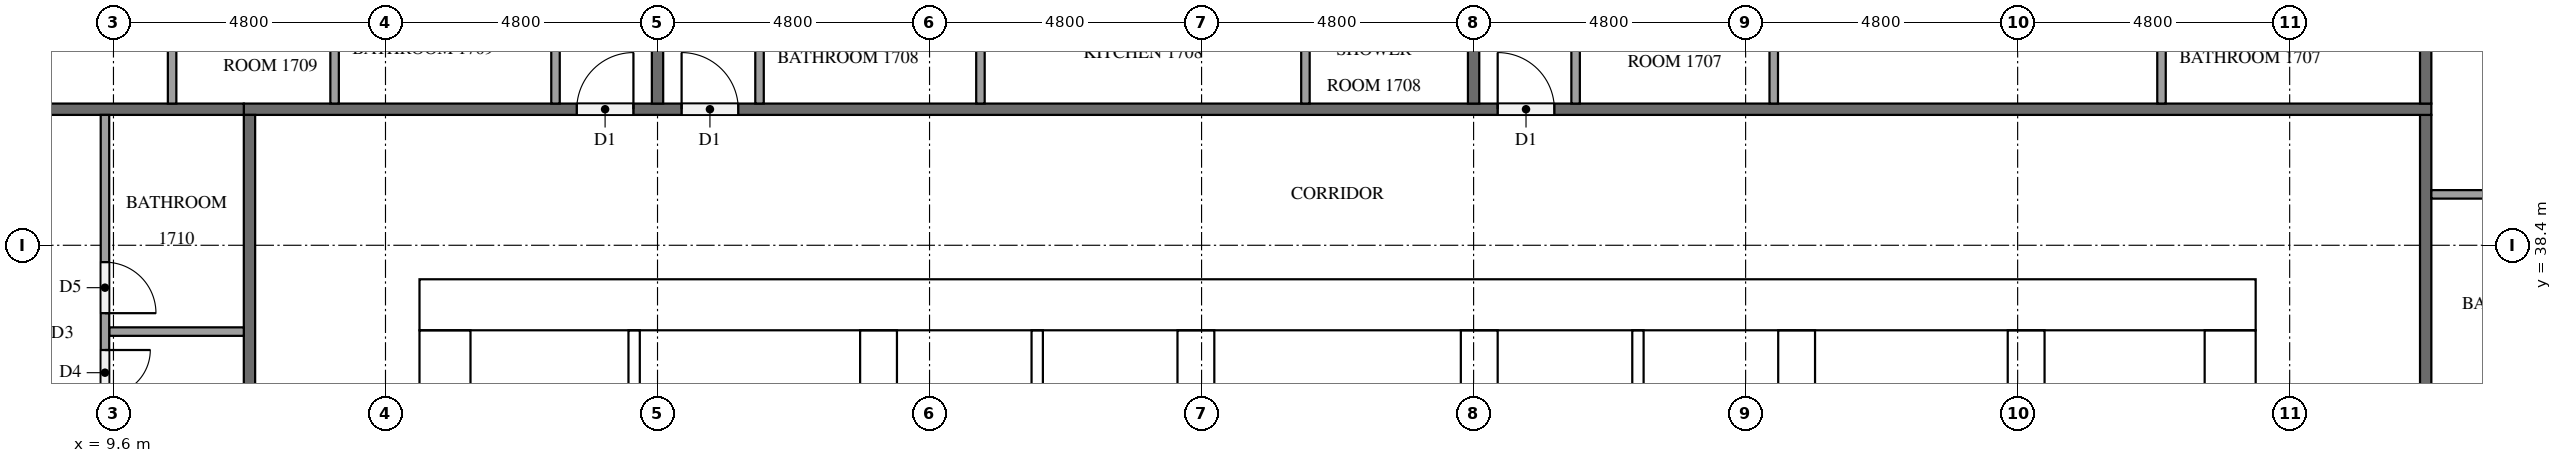
"""IFC4 building model, lengths in metres.
Left out: names, types, materials, properties, quantities, classifications, styles, units other than length and angle.
Written with IfcOpenShell. Run it as: python <this file> out.ifc"""

import sys

from ifc_helpers import new_model, si_unit, direction, frame, frame_2d, origin, place, context, subcontext, project, spatial, rectangle, extrude, element, fill, save


model = new_model("IFC4")
c1 = context("Model", 3, precision=1e-05, world=origin(), true_north=direction((0.0, 1.0)))
c2 = subcontext(c1, "Body", "Model", "MODEL_VIEW")
j1 = project(units=[si_unit("LENGTHUNIT", "METRE"), si_unit("PLANEANGLEUNIT", "RADIAN")], contexts=[c1])
p1 = place(None, origin())
s1 = spatial("IfcSite", under=j1, at=p1, CompositionType="ELEMENT")
p2 = place(p1, origin())
s2 = spatial("IfcBuilding", under=s1, at=p2, CompositionType="ELEMENT")
p3 = place(p2, frame((0.0, 0.0, 69.8)))
s3 = spatial("IfcBuildingStorey", under=s2, at=p3, CompositionType="ELEMENT", Elevation=69.8)
p4 = place(p3, frame((15.0, 37.35, 0.0), z_axis=(0.0, 0.0, 1.0), x_axis=(1.0, 0.0, 0.0)))
e1 = element("IfcWall", 1, at=p4, inside=s3, PredefinedType="SHEAR", context=c2, shape_type="SweptSolid", body=[
    extrude(rectangle(XDim=32.4, YDim=0.9, at=frame_2d((16.2, 0.0))), origin(), (0.0, 0.0, 1.0), 3.2),
])
p5 = place(p4, frame((15.3, 0.0, 0.0)))
e2 = element("IfcOpeningElement", 2, at=p5, cuts=e1, PredefinedType="OPENING", context=c2, shape_type="SweptSolid", body=[
    extrude(rectangle(XDim=1.8, YDim=2.1, at=frame_2d((0.9, 1.05))), frame((0.0, 0.46, 0.0), z_axis=(0.0, -1.0, 0.0), x_axis=(1.0, 0.0, 0.0)), (0.0, 0.0, 1.0), 0.92),
])
p6 = place(p4, frame((1.794, 0.0, 0.0)))
e3 = element("IfcOpeningElement", 3, at=p6, cuts=e1, PredefinedType="OPENING", context=c2, shape_type="SweptSolid", body=[
    extrude(rectangle(XDim=1.0, YDim=2.1, at=frame_2d((0.5, 1.05))), frame((0.0, 0.46, 0.0), z_axis=(0.0, -1.0, 0.0), x_axis=(1.0, 0.0, 0.0)), (0.0, 0.0, 1.0), 0.92),
])
p7 = place(p4, frame((5.331, 0.0, 0.0)))
e4 = element("IfcOpeningElement", 4, at=p7, cuts=e1, PredefinedType="OPENING", context=c2, shape_type="SweptSolid", body=[
    extrude(rectangle(XDim=1.0, YDim=2.1, at=frame_2d((0.5, 1.05))), frame((0.0, 0.46, 0.0), z_axis=(0.0, -1.0, 0.0), x_axis=(1.0, 0.0, 0.0)), (0.0, 0.0, 1.0), 0.92),
])
p8 = place(p3, frame((15.45, 15.9, 0.0), z_axis=(0.0, 0.0, 1.0), x_axis=(0.0, 1.0, 0.0)))
e5 = element("IfcWall", 5, at=p8, inside=s3, PredefinedType="SHEAR", context=c2, shape_type="SweptSolid", body=[
    extrude(rectangle(XDim=21.0, YDim=0.9, at=frame_2d((10.5, 0.0))), origin(), (0.0, 0.0, 1.0), 3.2),
])
p9 = place(p8, frame((4.86, 0.0, 0.0)))
e6 = element("IfcOpeningElement", 6, at=p9, cuts=e5, PredefinedType="OPENING", context=c2, shape_type="SweptSolid", body=[
    extrude(rectangle(XDim=1.2, YDim=2.1, at=frame_2d((0.6, 1.05))), frame((0.0, 0.46, 0.0), z_axis=(0.0, -1.0, 0.0), x_axis=(1.0, 0.0, 0.0)), (0.0, 0.0, 1.0), 0.92),
])
p10 = place(p3, frame((46.95, 15.9, 0.0), z_axis=(0.0, 0.0, 1.0), x_axis=(0.0, 1.0, 0.0)))
e7 = element("IfcWall", 7, at=p10, inside=s3, PredefinedType="SHEAR", context=c2, shape_type="SweptSolid", body=[
    extrude(rectangle(XDim=21.0, YDim=0.9, at=frame_2d((10.5, 0.0))), origin(), (0.0, 0.0, 1.0), 3.2),
])
p11 = place(p10, frame((10.2, 0.0, 0.0)))
e8 = element("IfcOpeningElement", 8, at=p11, cuts=e7, PredefinedType="OPENING", context=c2, shape_type="SweptSolid", body=[
    extrude(rectangle(XDim=1.2, YDim=2.1, at=frame_2d((0.6, 1.05))), frame((0.0, 0.46, 0.0), z_axis=(0.0, -1.0, 0.0), x_axis=(1.0, 0.0, 0.0)), (0.0, 0.0, 1.0), 0.92),
])
p12 = place(p3, frame((23.1, 15.9, 0.0), z_axis=(0.0, 0.0, 1.0), x_axis=(0.0, 1.0, 0.0)))
e9 = element("IfcWall", 9, at=p12, inside=s3, PredefinedType="SHEAR", context=c2, shape_type="SweptSolid", body=[
    extrude(rectangle(XDim=21.0, YDim=0.65, at=frame_2d((10.5, 0.0))), origin(), (0.0, 0.0, 1.0), 3.2),
])
p13 = place(p3, frame((39.3, 27.75, 0.0), z_axis=(0.0, 0.0, 1.0), x_axis=(0.0, 1.0, 0.0)))
e10 = element("IfcWall", 10, at=p13, inside=s3, PredefinedType="SHEAR", context=c2, shape_type="SweptSolid", body=[
    extrude(rectangle(XDim=9.15, YDim=0.65, at=frame_2d((4.575, 0.0))), origin(), (0.0, 0.0, 1.0), 3.2),
])
p14 = place(p3, frame((43.35, 27.75, 0.0), z_axis=(0.0, 0.0, 1.0), x_axis=(0.0, 1.0, 0.0)))
e11 = element("IfcWall", 11, at=p14, inside=s3, PredefinedType="SHEAR", context=c2, shape_type="SweptSolid", body=[
    extrude(rectangle(XDim=9.15, YDim=0.65, at=frame_2d((4.575, 0.0))), origin(), (0.0, 0.0, 1.0), 3.2),
])
p15 = place(p14, frame((7.65, 0.0, 0.0)))
e12 = element("IfcOpeningElement", 12, at=p15, cuts=e11, PredefinedType="OPENING", context=c2, shape_type="SweptSolid", body=[
    extrude(rectangle(XDim=1.2, YDim=2.1, at=frame_2d((0.6, 1.05))), frame((0.0, 0.335, 0.0), z_axis=(0.0, -1.0, 0.0), x_axis=(1.0, 0.0, 0.0)), (0.0, 0.0, 1.0), 0.67),
])
for number, where, z_axis, x_axis in (
    (13, (28.7, 33.875, 0.0), (0.0, 0.0, 1.0), (0.0, 1.0, 0.0)),
    (14, (33.7, 33.875, 0.0), (0.0, 0.0, 1.0), (0.0, 1.0, 0.0)),
):
    element("IfcWall", number, at=place(p3, frame(where, z_axis=z_axis, x_axis=x_axis)), inside=s3, PredefinedType="SHEAR", context=c2, shape_type="SweptSolid", body=[
        extrude(rectangle(XDim=3.025, YDim=0.65, at=frame_2d((1.512, 0.0))), origin(), (0.0, 0.0, 1.0), 3.2),
    ])
for number, where, z_axis, x_axis in (
    (15, (25.9, 33.875, 0.0), (0.0, 0.0, 1.0), (0.0, 1.0, 0.0)),
    (16, (36.5, 33.875, 0.0), (0.0, 0.0, 1.0), (0.0, 1.0, 0.0)),
):
    element("IfcWall", number, at=place(p3, frame(where, z_axis=z_axis, x_axis=x_axis)), inside=s3, PredefinedType="SOLIDWALL", context=c2, shape_type="SweptSolid", body=[
        extrude(rectangle(XDim=3.025, YDim=0.2, at=frame_2d((1.512, 0.0))), origin(), (0.0, 0.0, 1.0), 3.2),
    ])
p16 = place(p3, frame((18.788, 31.575, 0.0), z_axis=(0.0, 0.0, 1.0), x_axis=(0.0, 1.0, 0.0)))
e17 = element("IfcWall", 17, at=p16, inside=s3, PredefinedType="PARTITIONING", context=c2, shape_type="SweptSolid", body=[
    extrude(rectangle(XDim=5.325, YDim=0.2, at=frame_2d((2.663, 0.0))), origin(), (0.0, 0.0, 1.0), 3.2),
])
p17 = place(p3, frame((50.4, 40.7, 0.0), z_axis=(0.0, 0.0, 1.0), x_axis=(0.0, -1.0, 0.0)))
e18 = element("IfcWall", 18, at=p17, inside=s3, PredefinedType="PARTITIONING", context=c2, shape_type="SweptSolid", body=[
    extrude(rectangle(XDim=28.6, YDim=0.2, at=frame_2d((14.3, 0.0))), origin(), (0.0, 0.0, 1.0), 3.2),
])
p18 = place(p17, frame((21.875, 0.0, 0.0)))
e19 = element("IfcOpeningElement", 19, at=p18, cuts=e18, PredefinedType="OPENING", context=c2, shape_type="SweptSolid", body=[
    extrude(rectangle(XDim=1.1, YDim=2.1, at=frame_2d((0.55, 1.05))), frame((0.0, 0.11, 0.0), z_axis=(0.0, -1.0, 0.0), x_axis=(1.0, 0.0, 0.0)), (0.0, 0.0, 1.0), 0.22),
])
p19 = place(p17, frame((20.075, 0.0, 0.0)))
e20 = element("IfcOpeningElement", 20, at=p19, cuts=e18, PredefinedType="OPENING", context=c2, shape_type="SweptSolid", body=[
    extrude(rectangle(XDim=1.0, YDim=2.1, at=frame_2d((0.5, 1.05))), frame((0.0, 0.11, 0.0), z_axis=(0.0, -1.0, 0.0), x_axis=(1.0, 0.0, 0.0)), (0.0, 0.0, 1.0), 0.22),
])
p20 = place(p17, frame((5.675, 0.0, 0.0)))
e21 = element("IfcOpeningElement", 21, at=p20, cuts=e18, PredefinedType="OPENING", context=c2, shape_type="SweptSolid", body=[
    extrude(rectangle(XDim=1.0, YDim=2.1, at=frame_2d((0.5, 1.05))), frame((0.0, 0.11, 0.0), z_axis=(0.0, -1.0, 0.0), x_axis=(1.0, 0.0, 0.0)), (0.0, 0.0, 1.0), 0.22),
])
p21 = place(p3, frame((11.9, 40.8, 0.0), z_axis=(0.0, 0.0, 1.0), x_axis=(1.0, 0.0, 0.0)))
e22 = element("IfcWall", 22, at=p21, inside=s3, PredefinedType="PARTITIONING", context=c2, shape_type="SweptSolid", body=[
    extrude(rectangle(XDim=38.6, YDim=0.2, at=frame_2d((19.3, 0.0))), origin(), (0.0, 0.0, 1.0), 3.2),
])
p22 = place(p21, frame((22.125, 0.0, 0.0)))
e23 = element("IfcOpeningElement", 23, at=p22, cuts=e22, PredefinedType="OPENING", context=c2, shape_type="SweptSolid", body=[
    extrude(rectangle(XDim=1.0, YDim=2.1, at=frame_2d((0.5, 1.05))), frame((0.0, 0.11, 0.0), z_axis=(0.0, -1.0, 0.0), x_axis=(1.0, 0.0, 0.0)), (0.0, 0.0, 1.0), 0.22),
])
p23 = place(p21, frame((7.725, 0.0, 0.0)))
e24 = element("IfcOpeningElement", 24, at=p23, cuts=e22, PredefinedType="OPENING", context=c2, shape_type="SweptSolid", body=[
    extrude(rectangle(XDim=1.0, YDim=2.1, at=frame_2d((0.5, 1.05))), frame((0.0, 0.11, 0.0), z_axis=(0.0, -1.0, 0.0), x_axis=(1.0, 0.0, 0.0)), (0.0, 0.0, 1.0), 0.22),
])
p24 = place(p21, frame((5.875, 0.0, 0.0)))
e25 = element("IfcOpeningElement", 25, at=p24, cuts=e22, PredefinedType="OPENING", context=c2, shape_type="SweptSolid", body=[
    extrude(rectangle(XDim=1.0, YDim=2.1, at=frame_2d((0.5, 1.05))), frame((0.0, 0.11, 0.0), z_axis=(0.0, -1.0, 0.0), x_axis=(1.0, 0.0, 0.0)), (0.0, 0.0, 1.0), 0.22),
])
p25 = place(p3, frame((12.0, 12.1, 0.0), z_axis=(0.0, 0.0, 1.0), x_axis=(0.0, 1.0, 0.0)))
e26 = element("IfcWall", 26, at=p25, inside=s3, PredefinedType="PARTITIONING", context=c2, shape_type="SweptSolid", body=[
    extrude(rectangle(XDim=28.6, YDim=0.2, at=frame_2d((14.3, 0.0))), origin(), (0.0, 0.0, 1.0), 3.2),
])
p26 = place(p25, frame((14.725, 0.0, 0.0)))
e27 = element("IfcOpeningElement", 27, at=p26, cuts=e26, PredefinedType="OPENING", context=c2, shape_type="SweptSolid", body=[
    extrude(rectangle(XDim=1.0, YDim=2.1, at=frame_2d((0.5, 1.05))), frame((0.0, 0.11, 0.0), z_axis=(0.0, -1.0, 0.0), x_axis=(1.0, 0.0, 0.0)), (0.0, 0.0, 1.0), 0.22),
])
p27 = place(p25, frame((12.875, 0.0, 0.0)))
e28 = element("IfcOpeningElement", 28, at=p27, cuts=e26, PredefinedType="OPENING", context=c2, shape_type="SweptSolid", body=[
    extrude(rectangle(XDim=1.0, YDim=2.1, at=frame_2d((0.5, 1.05))), frame((0.0, 0.11, 0.0), z_axis=(0.0, -1.0, 0.0), x_axis=(1.0, 0.0, 0.0)), (0.0, 0.0, 1.0), 0.22),
])
p28 = place(p25, frame((0.875, 0.0, 0.0)))
e29 = element("IfcOpeningElement", 29, at=p28, cuts=e26, PredefinedType="OPENING", context=c2, shape_type="SweptSolid", body=[
    extrude(rectangle(XDim=1.0, YDim=2.1, at=frame_2d((0.5, 1.05))), frame((0.0, 0.11, 0.0), z_axis=(0.0, -1.0, 0.0), x_axis=(1.0, 0.0, 0.0)), (0.0, 0.0, 1.0), 0.22),
])
for number, where, z_axis, x_axis in (
    (30, (50.4, 40.9, 0.0), (0.0, 0.0, 1.0), (0.0, 1.0, 0.0)),
    (31, (33.6, 47.9, 0.0), (0.0, 0.0, 1.0), (0.0, -1.0, 0.0)),
):
    element("IfcWall", number, at=place(p3, frame(where, z_axis=z_axis, x_axis=x_axis)), inside=s3, PredefinedType="PARTITIONING", context=c2, shape_type="SweptSolid", body=[
        extrude(rectangle(XDim=7.0, YDim=0.2, at=frame_2d((3.5, 0.0))), origin(), (0.0, 0.0, 1.0), 3.2),
    ])
p29 = place(p3, frame((19.2, 47.575, 0.0), z_axis=(0.0, 0.0, 1.0), x_axis=(0.0, -1.0, 0.0)))
e32 = element("IfcWall", 32, at=p29, inside=s3, PredefinedType="PARTITIONING", context=c2, shape_type="SweptSolid", body=[
    extrude(rectangle(XDim=6.675, YDim=0.2, at=frame_2d((3.337, 0.0))), origin(), (0.0, 0.0, 1.0), 3.2),
])
p30 = place(p3, frame((4.9, 40.8, 0.0), z_axis=(0.0, 0.0, 1.0), x_axis=(1.0, 0.0, 0.0)))
e33 = element("IfcWall", 33, at=p30, inside=s3, PredefinedType="PARTITIONING", context=c2, shape_type="SweptSolid", body=[
    extrude(rectangle(XDim=7.0, YDim=0.2, at=frame_2d((3.5, 0.0))), origin(), (0.0, 0.0, 1.0), 3.2),
])
p31 = place(p3, frame((50.5, 39.298, 0.0), z_axis=(0.0, 0.0, 1.0), x_axis=(1.0, 0.0, 0.0)))
e34 = element("IfcWall", 34, at=p31, inside=s3, PredefinedType="PARTITIONING", context=c2, shape_type="SweptSolid", body=[
    extrude(rectangle(XDim=3.575, YDim=0.15, at=frame_2d((1.788, 0.0))), origin(), (0.0, 0.0, 1.0), 3.2),
])
for number, where, z_axis, x_axis in (
    (35, (38.896, 40.9, 0.0), (0.0, 0.0, 1.0), (0.0, 1.0, 0.0)),
    (36, (45.739, 40.9, 0.0), (0.0, 0.0, 1.0), (0.0, 1.0, 0.0)),
):
    element("IfcWall", number, at=place(p3, frame(where, z_axis=z_axis, x_axis=x_axis)), inside=s3, PredefinedType="PARTITIONING", context=c2, shape_type="SweptSolid", body=[
        extrude(rectangle(XDim=2.075, YDim=0.15, at=frame_2d((1.038, 0.0))), origin(), (0.0, 0.0, 1.0), 3.2),
    ])
p32 = place(p3, frame((35.4, 40.9, 0.0), z_axis=(0.0, 0.0, 1.0), x_axis=(0.0, 1.0, 0.0)))
e37 = element("IfcWall", 37, at=p32, inside=s3, PredefinedType="PARTITIONING", context=c2, shape_type="SweptSolid", body=[
    extrude(rectangle(XDim=2.225, YDim=0.15, at=frame_2d((1.113, 0.0))), origin(), (0.0, 0.0, 1.0), 3.2),
])
for number, where, z_axis, x_axis in (
    (38, (24.898, 40.9, 0.0), (0.0, 0.0, 1.0), (0.0, 1.0, 0.0)),
    (39, (30.633, 40.9, 0.0), (0.0, 0.0, 1.0), (0.0, 1.0, 0.0)),
):
    element("IfcWall", number, at=place(p3, frame(where, z_axis=z_axis, x_axis=x_axis)), inside=s3, PredefinedType="PARTITIONING", context=c2, shape_type="SweptSolid", body=[
        extrude(rectangle(XDim=1.775, YDim=0.15, at=frame_2d((0.888, 0.0))), origin(), (0.0, 0.0, 1.0), 3.2),
    ])
p33 = place(p3, frame((21.0, 40.9, 0.0), z_axis=(0.0, 0.0, 1.0), x_axis=(0.0, 1.0, 0.0)))
e40 = element("IfcWall", 40, at=p33, inside=s3, PredefinedType="PARTITIONING", context=c2, shape_type="SweptSolid", body=[
    extrude(rectangle(XDim=1.925, YDim=0.15, at=frame_2d((0.962, 0.0))), origin(), (0.0, 0.0, 1.0), 3.2),
])
for number, where, z_axis, x_axis in (
    (41, (13.502, 40.9, 0.0), (0.0, 0.0, 1.0), (0.0, 1.0, 0.0)),
    (42, (10.635, 40.9, 0.0), (0.0, 0.0, 1.0), (0.0, 1.0, 0.0)),
):
    element("IfcWall", number, at=place(p3, frame(where, z_axis=z_axis, x_axis=x_axis)), inside=s3, PredefinedType="PARTITIONING", context=c2, shape_type="SweptSolid", body=[
        extrude(rectangle(XDim=2.075, YDim=0.15, at=frame_2d((1.038, 0.0))), origin(), (0.0, 0.0, 1.0), 3.2),
    ])
p34 = place(p3, frame((17.4, 40.9, 0.0), z_axis=(0.0, 0.0, 1.0), x_axis=(0.0, 1.0, 0.0)))
e43 = element("IfcWall", 43, at=p34, inside=s3, PredefinedType="PARTITIONING", context=c2, shape_type="SweptSolid", body=[
    extrude(rectangle(XDim=2.225, YDim=0.15, at=frame_2d((1.113, 0.0))), origin(), (0.0, 0.0, 1.0), 3.2),
])
p35 = place(p3, frame((11.9, 36.877, 0.0), z_axis=(0.0, 0.0, 1.0), x_axis=(-1.0, 0.0, 0.0)))
e44 = element("IfcWall", 44, at=p35, inside=s3, PredefinedType="PARTITIONING", context=c2, shape_type="SweptSolid", body=[
    extrude(rectangle(XDim=2.375, YDim=0.15, at=frame_2d((1.188, 0.0))), origin(), (0.0, 0.0, 1.0), 3.2),
])
p36 = place(p3, frame((9.45, 40.7, 0.0), z_axis=(0.0, 0.0, 1.0), x_axis=(0.0, -1.0, 0.0)))
e45 = element("IfcWall", 45, at=p36, inside=s3, PredefinedType="PARTITIONING", context=c2, shape_type="SweptSolid", body=[
    extrude(rectangle(XDim=12.425, YDim=0.15, at=frame_2d((6.212, 0.0))), origin(), (0.0, 0.0, 1.0), 3.2),
])
p37 = place(p36, frame((11.225, 0.0, 0.0)))
e46 = element("IfcOpeningElement", 46, at=p37, cuts=e45, PredefinedType="OPENING", context=c2, shape_type="SweptSolid", body=[
    extrude(rectangle(XDim=0.9, YDim=2.1, at=frame_2d((0.45, 1.05))), frame((0.0, 0.085, 0.0), z_axis=(0.0, -1.0, 0.0), x_axis=(1.0, 0.0, 0.0)), (0.0, 0.0, 1.0), 0.17),
])
p38 = place(p36, frame((4.148, 0.0, 0.0)))
e47 = element("IfcOpeningElement", 47, at=p38, cuts=e45, PredefinedType="OPENING", context=c2, shape_type="SweptSolid", body=[
    extrude(rectangle(XDim=0.8, YDim=2.1, at=frame_2d((0.4, 1.05))), frame((0.0, 0.085, 0.0), z_axis=(0.0, -1.0, 0.0), x_axis=(1.0, 0.0, 0.0)), (0.0, 0.0, 1.0), 0.17),
])
p39 = place(p36, frame((2.598, 0.0, 0.0)))
e48 = element("IfcOpeningElement", 48, at=p39, cuts=e45, PredefinedType="OPENING", context=c2, shape_type="SweptSolid", body=[
    extrude(rectangle(XDim=0.9, YDim=2.1, at=frame_2d((0.45, 1.05))), frame((0.0, 0.085, 0.0), z_axis=(0.0, -1.0, 0.0), x_axis=(1.0, 0.0, 0.0)), (0.0, 0.0, 1.0), 0.17),
])
p40 = place(p15, origin())
e49 = element("IfcDoor", 49, at=p40, inside=s3, OperationType="SINGLE_SWING_LEFT", PredefinedType="DOOR", context=c2, shape_type="SweptSolid", body=[
    extrude(rectangle(XDim=1.2, YDim=2.1, at=frame_2d((0.6, 1.05))), frame((0.0, 0.025, 0.0), z_axis=(0.0, -1.0, 0.0), x_axis=(1.0, 0.0, 0.0)), (0.0, 0.0, 1.0), 0.05),
])
fill(e12, e49)
p41 = place(p5, origin())
e50 = element("IfcDoor", 50, at=p41, inside=s3, OperationType="DOUBLE_DOOR_SINGLE_SWING", PredefinedType="DOOR", context=c2, shape_type="SweptSolid", body=[
    extrude(rectangle(XDim=1.8, YDim=2.1, at=frame_2d((0.9, 1.05))), frame((0.0, 0.025, 0.0), z_axis=(0.0, -1.0, 0.0), x_axis=(1.0, 0.0, 0.0)), (0.0, 0.0, 1.0), 0.05),
])
fill(e2, e50)
p42 = place(p6, origin())
e51 = element("IfcDoor", 51, at=p42, inside=s3, OperationType="SINGLE_SWING_RIGHT", PredefinedType="DOOR", context=c2, shape_type="SweptSolid", body=[
    extrude(rectangle(XDim=1.0, YDim=2.1, at=frame_2d((0.5, 1.05))), frame((0.0, 0.025, 0.0), z_axis=(0.0, -1.0, 0.0), x_axis=(1.0, 0.0, 0.0)), (0.0, 0.0, 1.0), 0.05),
])
fill(e3, e51)
p43 = place(p7, origin())
e52 = element("IfcDoor", 52, at=p43, inside=s3, OperationType="SINGLE_SWING_LEFT", PredefinedType="DOOR", context=c2, shape_type="SweptSolid", body=[
    extrude(rectangle(XDim=1.0, YDim=2.1, at=frame_2d((0.5, 1.05))), frame((0.0, 0.025, 0.0), z_axis=(0.0, -1.0, 0.0), x_axis=(1.0, 0.0, 0.0)), (0.0, 0.0, 1.0), 0.05),
])
fill(e4, e52)
p44 = place(p22, origin())
e53 = element("IfcDoor", 53, at=p44, inside=s3, OperationType="SINGLE_SWING_LEFT", PredefinedType="DOOR", context=c2, shape_type="SweptSolid", body=[
    extrude(rectangle(XDim=1.0, YDim=2.1, at=frame_2d((0.5, 1.05))), frame((0.0, 0.025, 0.0), z_axis=(0.0, -1.0, 0.0), x_axis=(1.0, 0.0, 0.0)), (0.0, 0.0, 1.0), 0.05),
])
fill(e23, e53)
p45 = place(p23, origin())
e54 = element("IfcDoor", 54, at=p45, inside=s3, OperationType="SINGLE_SWING_LEFT", PredefinedType="DOOR", context=c2, shape_type="SweptSolid", body=[
    extrude(rectangle(XDim=1.0, YDim=2.1, at=frame_2d((0.5, 1.05))), frame((0.0, 0.025, 0.0), z_axis=(0.0, -1.0, 0.0), x_axis=(1.0, 0.0, 0.0)), (0.0, 0.0, 1.0), 0.05),
])
fill(e24, e54)
p46 = place(p24, origin())
e55 = element("IfcDoor", 55, at=p46, inside=s3, OperationType="SINGLE_SWING_RIGHT", PredefinedType="DOOR", context=c2, shape_type="SweptSolid", body=[
    extrude(rectangle(XDim=1.0, YDim=2.1, at=frame_2d((0.5, 1.05))), frame((0.0, 0.025, 0.0), z_axis=(0.0, -1.0, 0.0), x_axis=(1.0, 0.0, 0.0)), (0.0, 0.0, 1.0), 0.05),
])
fill(e25, e55)
p47 = place(p38, origin())
e56 = element("IfcDoor", 56, at=p47, inside=s3, OperationType="SINGLE_SWING_LEFT", PredefinedType="DOOR", context=c2, shape_type="SweptSolid", body=[
    extrude(rectangle(XDim=0.8, YDim=2.1, at=frame_2d((0.4, 1.05))), frame((0.0, 0.025, 0.0), z_axis=(0.0, -1.0, 0.0), x_axis=(1.0, 0.0, 0.0)), (0.0, 0.0, 1.0), 0.05),
])
fill(e47, e56)
p48 = place(p39, origin())
e57 = element("IfcDoor", 57, at=p48, inside=s3, OperationType="SINGLE_SWING_RIGHT", PredefinedType="DOOR", context=c2, shape_type="SweptSolid", body=[
    extrude(rectangle(XDim=0.9, YDim=2.1, at=frame_2d((0.45, 1.05))), frame((0.0, 0.025, 0.0), z_axis=(0.0, -1.0, 0.0), x_axis=(1.0, 0.0, 0.0)), (0.0, 0.0, 1.0), 0.05),
])
fill(e48, e57)
save(model, sys.argv[1])
